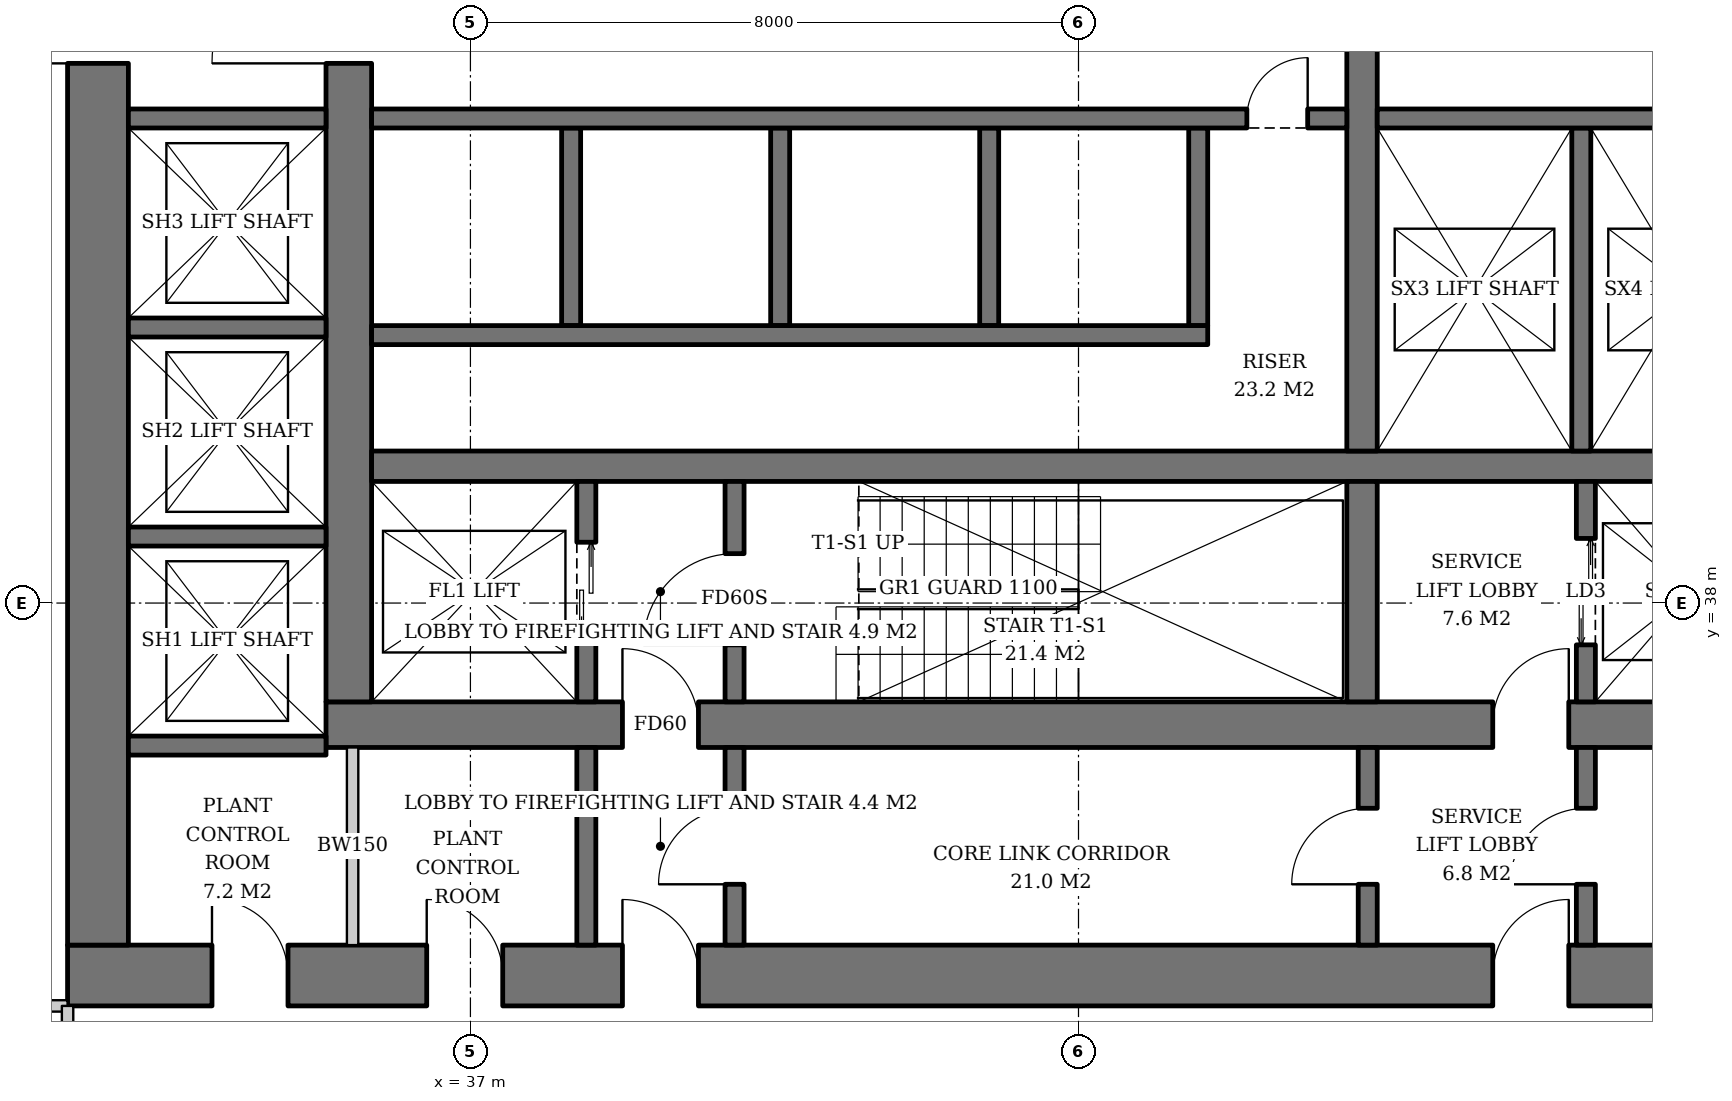
"""IFC4 building model, lengths in metres.
Left out: names, types, materials, properties, quantities, classifications, styles, units other than length and angle.
Written with IfcOpenShell. Run it as: python <this file> out.ifc"""

import sys

from ifc_helpers import new_model, si_unit, direction, frame, frame_2d, origin, place, context, subcontext, project, spatial, rectangle, extrude, element, fill, save


model = new_model("IFC4")
c1 = context("Model", 3, precision=1e-05, world=origin(), true_north=direction((0.0, 1.0)))
c2 = subcontext(c1, "Body", "Model", "MODEL_VIEW")
j1 = project(units=[si_unit("LENGTHUNIT", "METRE"), si_unit("PLANEANGLEUNIT", "RADIAN")], contexts=[c1])
p1 = place(None, origin())
s1 = spatial("IfcSite", under=j1, at=p1, CompositionType="ELEMENT")
p2 = place(p1, origin())
s2 = spatial("IfcBuilding", under=s1, at=p2, CompositionType="ELEMENT")
p3 = place(p2, frame((0.0, 0.0, 85.6)))
s3 = spatial("IfcBuildingStorey", under=s2, at=p3, CompositionType="ELEMENT", Elevation=85.6)
p4 = place(p3, frame((35.1, 36.4, 0.0), z_axis=(0.0, 0.0, 1.0), x_axis=(1.0, 0.0, 0.0)))
e1 = element("IfcWall", 1, at=p4, inside=s3, PredefinedType="SHEAR", context=c2, shape_type="SweptSolid", body=[
    extrude(rectangle(XDim=19.8, YDim=0.6, at=frame_2d((9.9, 0.0))), origin(), (0.0, 0.0, 1.0), 3.8),
])
p5 = place(p4, frame((3.9, 0.0, 0.0)))
e2 = element("IfcOpeningElement", 2, at=p5, cuts=e1, PredefinedType="OPENING", context=c2, shape_type="SweptSolid", body=[
    extrude(rectangle(XDim=1.0, YDim=2.1, at=frame_2d((0.5, 1.05))), frame((0.0, 0.31, 0.0), z_axis=(0.0, -1.0, 0.0), x_axis=(1.0, 0.0, 0.0)), (0.0, 0.0, 1.0), 0.62),
])
p6 = place(p4, frame((15.35, 0.0, 0.0)))
e3 = element("IfcOpeningElement", 3, at=p6, cuts=e1, PredefinedType="OPENING", context=c2, shape_type="SweptSolid", body=[
    extrude(rectangle(XDim=1.0, YDim=2.1, at=frame_2d((0.5, 1.05))), frame((0.0, 0.31, 0.0), z_axis=(0.0, -1.0, 0.0), x_axis=(1.0, 0.0, 0.0)), (0.0, 0.0, 1.0), 0.62),
])
p7 = place(p3, frame((35.4, 36.7, 0.0), z_axis=(0.0, 0.0, 1.0), x_axis=(0.0, 1.0, 0.0)))
e4 = element("IfcWall", 4, at=p7, inside=s3, PredefinedType="SHEAR", context=c2, shape_type="SweptSolid", body=[
    extrude(rectangle(XDim=18.6, YDim=0.6, at=frame_2d((9.3, 0.0))), origin(), (0.0, 0.0, 1.0), 3.8),
])
p8 = place(p7, frame((8.4, 0.0, 0.0)))
e5 = element("IfcOpeningElement", 5, at=p8, cuts=e4, PredefinedType="OPENING", context=c2, shape_type="SweptSolid", body=[
    extrude(rectangle(XDim=1.8, YDim=2.4, at=frame_2d((0.9, 1.2))), frame((0.0, 0.31, 0.0), z_axis=(0.0, -1.0, 0.0), x_axis=(1.0, 0.0, 0.0)), (0.0, 0.0, 1.0), 0.62),
])
p9 = place(p3, frame((31.7, 33.1, 0.0), z_axis=(0.0, 0.0, 1.0), x_axis=(1.0, 0.0, 0.0)))
e6 = element("IfcWall", 6, at=p9, inside=s3, PredefinedType="SHEAR", context=c2, shape_type="SweptSolid", body=[
    extrude(rectangle(XDim=26.6, YDim=0.8, at=frame_2d((13.3, 0.0))), origin(), (0.0, 0.0, 1.0), 3.8),
])
p10 = place(p9, frame((7.3, 0.0, 0.0)))
e7 = element("IfcOpeningElement", 7, at=p10, cuts=e6, PredefinedType="OPENING", context=c2, shape_type="SweptSolid", body=[
    extrude(rectangle(XDim=1.0, YDim=2.1, at=frame_2d((0.5, 1.05))), frame((0.0, 0.41, 0.0), z_axis=(0.0, -1.0, 0.0), x_axis=(1.0, 0.0, 0.0)), (0.0, 0.0, 1.0), 0.82),
])
p11 = place(p9, frame((18.75, 0.0, 0.0)))
e8 = element("IfcOpeningElement", 8, at=p11, cuts=e6, PredefinedType="OPENING", context=c2, shape_type="SweptSolid", body=[
    extrude(rectangle(XDim=1.0, YDim=2.1, at=frame_2d((0.5, 1.05))), frame((0.0, 0.41, 0.0), z_axis=(0.0, -1.0, 0.0), x_axis=(1.0, 0.0, 0.0)), (0.0, 0.0, 1.0), 0.82),
])
p12 = place(p9, frame((1.9, 0.0, 0.0)))
e9 = element("IfcOpeningElement", 9, at=p12, cuts=e6, PredefinedType="OPENING", context=c2, shape_type="SweptSolid", body=[
    extrude(rectangle(XDim=1.0, YDim=2.1, at=frame_2d((0.5, 1.05))), frame((0.0, 0.41, 0.0), z_axis=(0.0, -1.0, 0.0), x_axis=(1.0, 0.0, 0.0)), (0.0, 0.0, 1.0), 0.82),
])
p13 = place(p9, frame((4.725, 0.0, 0.0)))
e10 = element("IfcOpeningElement", 10, at=p13, cuts=e6, PredefinedType="OPENING", context=c2, shape_type="SweptSolid", body=[
    extrude(rectangle(XDim=1.0, YDim=2.1, at=frame_2d((0.5, 1.05))), frame((0.0, 0.41, 0.0), z_axis=(0.0, -1.0, 0.0), x_axis=(1.0, 0.0, 0.0)), (0.0, 0.0, 1.0), 0.82),
])
p14 = place(p3, frame((32.1, 33.5, 0.0), z_axis=(0.0, 0.0, 1.0), x_axis=(0.0, 1.0, 0.0)))
e11 = element("IfcWall", 11, at=p14, inside=s3, PredefinedType="SHEAR", context=c2, shape_type="SweptSolid", body=[
    extrude(rectangle(XDim=25.0, YDim=0.8, at=frame_2d((12.5, 0.0))), origin(), (0.0, 0.0, 1.0), 3.8),
])
p15 = place(p14, frame((11.6, 0.0, 0.0)))
e12 = element("IfcOpeningElement", 12, at=p15, cuts=e11, PredefinedType="OPENING", context=c2, shape_type="SweptSolid", body=[
    extrude(rectangle(XDim=1.8, YDim=2.4, at=frame_2d((0.9, 1.2))), frame((0.0, 0.41, 0.0), z_axis=(0.0, -1.0, 0.0), x_axis=(1.0, 0.0, 0.0)), (0.0, 0.0, 1.0), 0.82),
])
p16 = place(p3, frame((35.7, 39.8, 0.0), z_axis=(0.0, 0.0, 1.0), x_axis=(1.0, 0.0, 0.0)))
e13 = element("IfcWall", 13, at=p16, inside=s3, PredefinedType="SHEAR", context=c2, shape_type="SweptSolid", body=[
    extrude(rectangle(XDim=18.6, YDim=0.4, at=frame_2d((9.3, 0.0))), origin(), (0.0, 0.0, 1.0), 3.8),
])
p17 = place(p3, frame((48.73, 36.7, 0.0), z_axis=(0.0, 0.0, 1.0), x_axis=(0.0, 1.0, 0.0)))
e14 = element("IfcWall", 14, at=p17, inside=s3, PredefinedType="SHEAR", context=c2, shape_type="SweptSolid", body=[
    extrude(rectangle(XDim=2.9, YDim=0.4, at=frame_2d((1.45, 0.0))), origin(), (0.0, 0.0, 1.0), 3.8),
])
p18 = place(p3, frame((48.73, 40.0, 0.0), z_axis=(0.0, 0.0, 1.0), x_axis=(0.0, 1.0, 0.0)))
e15 = element("IfcWall", 15, at=p18, inside=s3, PredefinedType="SHEAR", context=c2, shape_type="SweptSolid", body=[
    extrude(rectangle(XDim=12.0, YDim=0.4, at=frame_2d((6.0, 0.0))), origin(), (0.0, 0.0, 1.0), 3.8),
])
p19 = place(p18, frame((5.5, 0.0, 0.0)))
e16 = element("IfcOpeningElement", 16, at=p19, cuts=e15, PredefinedType="OPENING", context=c2, shape_type="SweptSolid", body=[
    extrude(rectangle(XDim=1.0, YDim=2.1, at=frame_2d((0.5, 1.05))), frame((0.0, 0.21, 0.0), z_axis=(0.0, -1.0, 0.0), x_axis=(1.0, 0.0, 0.0)), (0.0, 0.0, 1.0), 0.42),
])
p20 = place(p3, frame((38.525, 36.7, 0.0), z_axis=(0.0, 0.0, 1.0), x_axis=(0.0, 1.0, 0.0)))
e17 = element("IfcWall", 17, at=p20, inside=s3, PredefinedType="SHEAR", context=c2, shape_type="SweptSolid", body=[
    extrude(rectangle(XDim=2.9, YDim=0.25, at=frame_2d((1.45, 0.0))), origin(), (0.0, 0.0, 1.0), 3.8),
])
p21 = place(p20, frame((0.8, 0.0, 0.0)))
e18 = element("IfcOpeningElement", 18, at=p21, cuts=e17, PredefinedType="OPENING", context=c2, shape_type="SweptSolid", body=[
    extrude(rectangle(XDim=1.3, YDim=2.2, at=frame_2d((0.65, 1.1))), frame((0.0, 0.135, 0.0), z_axis=(0.0, -1.0, 0.0), x_axis=(1.0, 0.0, 0.0)), (0.0, 0.0, 1.0), 0.27),
])
p22 = place(p3, frame((40.475, 36.7, 0.0), z_axis=(0.0, 0.0, 1.0), x_axis=(0.0, 1.0, 0.0)))
e19 = element("IfcWall", 19, at=p22, inside=s3, PredefinedType="SHEAR", context=c2, shape_type="SweptSolid", body=[
    extrude(rectangle(XDim=2.9, YDim=0.25, at=frame_2d((1.45, 0.0))), origin(), (0.0, 0.0, 1.0), 3.8),
])
p23 = place(p22, frame((0.75, 0.0, 0.0)))
e20 = element("IfcOpeningElement", 20, at=p23, cuts=e19, PredefinedType="OPENING", context=c2, shape_type="SweptSolid", body=[
    extrude(rectangle(XDim=1.2, YDim=2.1, at=frame_2d((0.6, 1.05))), frame((0.0, 0.135, 0.0), z_axis=(0.0, -1.0, 0.0), x_axis=(1.0, 0.0, 0.0)), (0.0, 0.0, 1.0), 0.27),
])
p24 = place(p3, frame((51.675, 36.7, 0.0), z_axis=(0.0, 0.0, 1.0), x_axis=(0.0, 1.0, 0.0)))
e21 = element("IfcWall", 21, at=p24, inside=s3, PredefinedType="SHEAR", context=c2, shape_type="SweptSolid", body=[
    extrude(rectangle(XDim=2.9, YDim=0.25, at=frame_2d((1.45, 0.0))), origin(), (0.0, 0.0, 1.0), 3.8),
])
p25 = place(p24, frame((0.75, 0.0, 0.0)))
e22 = element("IfcOpeningElement", 22, at=p25, cuts=e21, PredefinedType="OPENING", context=c2, shape_type="SweptSolid", body=[
    extrude(rectangle(XDim=1.4, YDim=2.4, at=frame_2d((0.7, 1.2))), frame((0.0, 0.135, 0.0), z_axis=(0.0, -1.0, 0.0), x_axis=(1.0, 0.0, 0.0)), (0.0, 0.0, 1.0), 0.27),
])
for number, where, z_axis, x_axis in (
    (23, (38.325, 44.25, 0.0), (0.0, 0.0, 1.0), (0.0, -1.0, 0.0)),
    (24, (41.075, 44.25, 0.0), (0.0, 0.0, 1.0), (0.0, -1.0, 0.0)),
    (25, (43.825, 44.25, 0.0), (0.0, 0.0, 1.0), (0.0, -1.0, 0.0)),
    (26, (46.575, 44.25, 0.0), (0.0, 0.0, 1.0), (0.0, -1.0, 0.0)),
):
    element("IfcWall", number, at=place(p3, frame(where, z_axis=z_axis, x_axis=x_axis)), inside=s3, PredefinedType="SHEAR", context=c2, shape_type="SweptSolid", body=[
        extrude(rectangle(XDim=2.6, YDim=0.25, at=frame_2d((1.3, 0.0))), origin(), (0.0, 0.0, 1.0), 3.8),
    ])
p26 = place(p3, frame((35.7, 41.525, 0.0), z_axis=(0.0, 0.0, 1.0), x_axis=(1.0, 0.0, 0.0)))
e27 = element("IfcWall", 27, at=p26, inside=s3, PredefinedType="SHEAR", context=c2, shape_type="SweptSolid", body=[
    extrude(rectangle(XDim=11.0, YDim=0.25, at=frame_2d((5.5, 0.0))), origin(), (0.0, 0.0, 1.0), 3.8),
])
p27 = place(p3, frame((35.7, 44.375, 0.0), z_axis=(0.0, 0.0, 1.0), x_axis=(1.0, 0.0, 0.0)))
e28 = element("IfcWall", 28, at=p27, inside=s3, PredefinedType="SHEAR", context=c2, shape_type="SweptSolid", body=[
    extrude(rectangle(XDim=12.83, YDim=0.25, at=frame_2d((6.415, 0.0))), origin(), (0.0, 0.0, 1.0), 3.8),
])
p28 = place(p27, frame((11.515, 0.0, 0.0)))
e29 = element("IfcOpeningElement", 29, at=p28, cuts=e28, PredefinedType="OPENING", context=c2, shape_type="SweptSolid", body=[
    extrude(rectangle(XDim=0.8, YDim=2.0, at=frame_2d((0.4, 1.0))), frame((0.0, 0.135, 0.0), z_axis=(0.0, -1.0, 0.0), x_axis=(1.0, 0.0, 0.0)), (0.0, 0.0, 1.0), 0.27),
])
p29 = place(p3, frame((51.615, 44.25, 0.0), z_axis=(0.0, 0.0, 1.0), x_axis=(0.0, -1.0, 0.0)))
e30 = element("IfcWall", 30, at=p29, inside=s3, PredefinedType="SHEAR", context=c2, shape_type="SweptSolid", body=[
    extrude(rectangle(XDim=4.25, YDim=0.25, at=frame_2d((2.125, 0.0))), origin(), (0.0, 0.0, 1.0), 3.8),
])
p30 = place(p3, frame((48.93, 44.375, 0.0), z_axis=(0.0, 0.0, 1.0), x_axis=(1.0, 0.0, 0.0)))
e31 = element("IfcWall", 31, at=p30, inside=s3, PredefinedType="SHEAR", context=c2, shape_type="SweptSolid", body=[
    extrude(rectangle(XDim=5.37, YDim=0.25, at=frame_2d((2.685, 0.0))), origin(), (0.0, 0.0, 1.0), 3.8),
])
for number, where, z_axis, x_axis in (
    (32, (32.5, 36.125, 0.0), (0.0, 0.0, 1.0), (1.0, 0.0, 0.0)),
    (33, (32.5, 38.875, 0.0), (0.0, 0.0, 1.0), (1.0, 0.0, 0.0)),
    (34, (32.5, 41.625, 0.0), (0.0, 0.0, 1.0), (1.0, 0.0, 0.0)),
    (35, (32.5, 44.375, 0.0), (0.0, 0.0, 1.0), (1.0, 0.0, 0.0)),
):
    element("IfcWall", number, at=place(p3, frame(where, z_axis=z_axis, x_axis=x_axis)), inside=s3, PredefinedType="SHEAR", context=c2, shape_type="SweptSolid", body=[
        extrude(rectangle(XDim=2.6, YDim=0.25, at=frame_2d((1.3, 0.0))), origin(), (0.0, 0.0, 1.0), 3.8),
    ])
p31 = place(p3, frame((38.525, 33.5, 0.0), z_axis=(0.0, 0.0, 1.0), x_axis=(0.0, 1.0, 0.0)))
e36 = element("IfcWall", 36, at=p31, inside=s3, PredefinedType="SOLIDWALL", context=c2, shape_type="SweptSolid", body=[
    extrude(rectangle(XDim=2.6, YDim=0.25, at=frame_2d((1.3, 0.0))), origin(), (0.0, 0.0, 1.0), 3.6),
])
p32 = place(p3, frame((40.475, 33.5, 0.0), z_axis=(0.0, 0.0, 1.0), x_axis=(0.0, 1.0, 0.0)))
e37 = element("IfcWall", 37, at=p32, inside=s3, PredefinedType="SOLIDWALL", context=c2, shape_type="SweptSolid", body=[
    extrude(rectangle(XDim=2.6, YDim=0.25, at=frame_2d((1.3, 0.0))), origin(), (0.0, 0.0, 1.0), 3.6),
])
p33 = place(p32, frame((0.8, 0.0, 0.0)))
e38 = element("IfcOpeningElement", 38, at=p33, cuts=e37, PredefinedType="OPENING", context=c2, shape_type="SweptSolid", body=[
    extrude(rectangle(XDim=1.0, YDim=2.1, at=frame_2d((0.5, 1.05))), frame((0.0, 0.135, 0.0), z_axis=(0.0, -1.0, 0.0), x_axis=(1.0, 0.0, 0.0)), (0.0, 0.0, 1.0), 0.27),
])
p34 = place(p3, frame((48.805, 33.5, 0.0), z_axis=(0.0, 0.0, 1.0), x_axis=(0.0, 1.0, 0.0)))
e39 = element("IfcWall", 39, at=p34, inside=s3, PredefinedType="SOLIDWALL", context=c2, shape_type="SweptSolid", body=[
    extrude(rectangle(XDim=2.6, YDim=0.25, at=frame_2d((1.3, 0.0))), origin(), (0.0, 0.0, 1.0), 3.6),
])
p35 = place(p34, frame((0.8, 0.0, 0.0)))
e40 = element("IfcOpeningElement", 40, at=p35, cuts=e39, PredefinedType="OPENING", context=c2, shape_type="SweptSolid", body=[
    extrude(rectangle(XDim=1.0, YDim=2.1, at=frame_2d((0.5, 1.05))), frame((0.0, 0.135, 0.0), z_axis=(0.0, -1.0, 0.0), x_axis=(1.0, 0.0, 0.0)), (0.0, 0.0, 1.0), 0.27),
])
p36 = place(p3, frame((51.675, 33.5, 0.0), z_axis=(0.0, 0.0, 1.0), x_axis=(0.0, 1.0, 0.0)))
e41 = element("IfcWall", 41, at=p36, inside=s3, PredefinedType="SOLIDWALL", context=c2, shape_type="SweptSolid", body=[
    extrude(rectangle(XDim=2.6, YDim=0.25, at=frame_2d((1.3, 0.0))), origin(), (0.0, 0.0, 1.0), 3.6),
])
p37 = place(p36, frame((0.8, 0.0, 0.0)))
e42 = element("IfcOpeningElement", 42, at=p37, cuts=e41, PredefinedType="OPENING", context=c2, shape_type="SweptSolid", body=[
    extrude(rectangle(XDim=1.0, YDim=2.1, at=frame_2d((0.5, 1.05))), frame((0.0, 0.135, 0.0), z_axis=(0.0, -1.0, 0.0), x_axis=(1.0, 0.0, 0.0)), (0.0, 0.0, 1.0), 0.27),
])
p38 = place(p3, frame((35.45, 33.5, 0.0), z_axis=(0.0, 0.0, 1.0), x_axis=(0.0, 1.0, 0.0)))
e43 = element("IfcWall", 43, at=p38, inside=s3, PredefinedType="SOLIDWALL", context=c2, shape_type="SweptSolid", body=[
    extrude(rectangle(XDim=2.6, YDim=0.15, at=frame_2d((1.3, 0.0))), origin(), (0.0, 0.0, 1.0), 3.6),
])
p39 = place(p3, frame((31.7, 32.7, 0.0), z_axis=(0.0, 0.0, 1.0), x_axis=(-1.0, 0.0, 0.0)))
e44 = element("IfcWall", 44, at=p39, inside=s3, PredefinedType="PARTITIONING", context=c2, shape_type="SweptSolid", body=[
    extrude(rectangle(XDim=2.0, YDim=0.15, at=frame_2d((1.0, 0.0))), origin(), (0.0, 0.0, 1.0), 3.6),
])
p40 = place(p3, frame((31.7, 32.7, 0.0), z_axis=(0.0, 0.0, 1.0), x_axis=(0.0, -1.0, 0.0)))
e45 = element("IfcWall", 45, at=p40, inside=s3, PredefinedType="PARTITIONING", context=c2, shape_type="SweptSolid", body=[
    extrude(rectangle(XDim=2.0, YDim=0.15, at=frame_2d((1.0, 0.0))), origin(), (0.0, 0.0, 1.0), 2.592),
])
p41 = place(p21, origin())
e46 = element("IfcDoor", 46, at=p41, inside=s3, OperationType="DOUBLE_DOOR_SLIDING", PredefinedType="DOOR", context=c2, shape_type="SweptSolid", body=[
    extrude(rectangle(XDim=1.3, YDim=2.2, at=frame_2d((0.65, 1.1))), frame((0.0, 0.025, 0.0), z_axis=(0.0, -1.0, 0.0), x_axis=(1.0, 0.0, 0.0)), (0.0, 0.0, 1.0), 0.05),
])
fill(e18, e46)
p42 = place(p23, origin())
e47 = element("IfcDoor", 47, at=p42, inside=s3, OperationType="SINGLE_SWING_LEFT", PredefinedType="DOOR", context=c2, shape_type="SweptSolid", body=[
    extrude(rectangle(XDim=1.2, YDim=2.1, at=frame_2d((0.6, 1.05))), frame((0.0, 0.025, 0.0), z_axis=(0.0, -1.0, 0.0), x_axis=(1.0, 0.0, 0.0)), (0.0, 0.0, 1.0), 0.05),
])
fill(e20, e47)
p43 = place(p25, origin())
e48 = element("IfcDoor", 48, at=p43, inside=s3, OperationType="DOUBLE_DOOR_SLIDING", PredefinedType="DOOR", context=c2, shape_type="SweptSolid", body=[
    extrude(rectangle(XDim=1.4, YDim=2.4, at=frame_2d((0.7, 1.2))), frame((0.0, 0.025, 0.0), z_axis=(0.0, -1.0, 0.0), x_axis=(1.0, 0.0, 0.0)), (0.0, 0.0, 1.0), 0.05),
])
fill(e22, e48)
p44 = place(p28, origin())
e49 = element("IfcDoor", 49, at=p44, inside=s3, OperationType="SINGLE_SWING_RIGHT", PredefinedType="DOOR", context=c2, shape_type="SweptSolid", body=[
    extrude(rectangle(XDim=0.8, YDim=2.0, at=frame_2d((0.4, 1.0))), frame((0.0, 0.025, 0.0), z_axis=(0.0, -1.0, 0.0), x_axis=(1.0, 0.0, 0.0)), (0.0, 0.0, 1.0), 0.05),
])
fill(e29, e49)
p45 = place(p33, origin())
e50 = element("IfcDoor", 50, at=p45, inside=s3, OperationType="SINGLE_SWING_LEFT", PredefinedType="DOOR", context=c2, shape_type="SweptSolid", body=[
    extrude(rectangle(XDim=1.0, YDim=2.1, at=frame_2d((0.5, 1.05))), frame((0.0, 0.025, 0.0), z_axis=(0.0, -1.0, 0.0), x_axis=(1.0, 0.0, 0.0)), (0.0, 0.0, 1.0), 0.05),
])
fill(e38, e50)
p46 = place(p35, origin())
e51 = element("IfcDoor", 51, at=p46, inside=s3, OperationType="SINGLE_SWING_LEFT", PredefinedType="DOOR", context=c2, shape_type="SweptSolid", body=[
    extrude(rectangle(XDim=1.0, YDim=2.1, at=frame_2d((0.5, 1.05))), frame((0.0, 0.025, 0.0), z_axis=(0.0, -1.0, 0.0), x_axis=(1.0, 0.0, 0.0)), (0.0, 0.0, 1.0), 0.05),
])
fill(e40, e51)
p47 = place(p37, origin())
e52 = element("IfcDoor", 52, at=p47, inside=s3, OperationType="SINGLE_SWING_LEFT", PredefinedType="DOOR", context=c2, shape_type="SweptSolid", body=[
    extrude(rectangle(XDim=1.0, YDim=2.1, at=frame_2d((0.5, 1.05))), frame((0.0, 0.025, 0.0), z_axis=(0.0, -1.0, 0.0), x_axis=(1.0, 0.0, 0.0)), (0.0, 0.0, 1.0), 0.05),
])
fill(e42, e52)
p48 = place(p5, origin())
e53 = element("IfcDoor", 53, at=p48, inside=s3, OperationType="SINGLE_SWING_LEFT", PredefinedType="DOOR", context=c2, shape_type="SweptSolid", body=[
    extrude(rectangle(XDim=1.0, YDim=2.1, at=frame_2d((0.5, 1.05))), frame((0.0, 0.025, 0.0), z_axis=(0.0, -1.0, 0.0), x_axis=(1.0, 0.0, 0.0)), (0.0, 0.0, 1.0), 0.05),
])
fill(e2, e53)
p49 = place(p8, origin())
e54 = element("IfcDoor", 54, at=p49, inside=s3, OperationType="DOUBLE_DOOR_SINGLE_SWING", PredefinedType="DOOR", context=c2, shape_type="SweptSolid", body=[
    extrude(rectangle(XDim=1.8, YDim=2.4, at=frame_2d((0.9, 1.2))), frame((0.0, 0.025, 0.0), z_axis=(0.0, -1.0, 0.0), x_axis=(1.0, 0.0, 0.0)), (0.0, 0.0, 1.0), 0.05),
])
fill(e5, e54)
p50 = place(p6, origin())
e55 = element("IfcDoor", 55, at=p50, inside=s3, OperationType="SINGLE_SWING_RIGHT", PredefinedType="DOOR", context=c2, shape_type="SweptSolid", body=[
    extrude(rectangle(XDim=1.0, YDim=2.1, at=frame_2d((0.5, 1.05))), frame((0.0, 0.025, 0.0), z_axis=(0.0, -1.0, 0.0), x_axis=(1.0, 0.0, 0.0)), (0.0, 0.0, 1.0), 0.05),
])
fill(e3, e55)
p51 = place(p15, origin())
e56 = element("IfcDoor", 56, at=p51, inside=s3, OperationType="DOUBLE_DOOR_SINGLE_SWING", PredefinedType="DOOR", context=c2, shape_type="SweptSolid", body=[
    extrude(rectangle(XDim=1.8, YDim=2.4, at=frame_2d((0.9, 1.2))), frame((0.0, 0.025, 0.0), z_axis=(0.0, -1.0, 0.0), x_axis=(1.0, 0.0, 0.0)), (0.0, 0.0, 1.0), 0.05),
])
fill(e12, e56)
p52 = place(p10, origin())
e57 = element("IfcDoor", 57, at=p52, inside=s3, OperationType="SINGLE_SWING_LEFT", PredefinedType="DOOR", context=c2, shape_type="SweptSolid", body=[
    extrude(rectangle(XDim=1.0, YDim=2.1, at=frame_2d((0.5, 1.05))), frame((0.0, 0.025, 0.0), z_axis=(0.0, -1.0, 0.0), x_axis=(1.0, 0.0, 0.0)), (0.0, 0.0, 1.0), 0.05),
])
fill(e7, e57)
p53 = place(p11, origin())
e58 = element("IfcDoor", 58, at=p53, inside=s3, OperationType="SINGLE_SWING_RIGHT", PredefinedType="DOOR", context=c2, shape_type="SweptSolid", body=[
    extrude(rectangle(XDim=1.0, YDim=2.1, at=frame_2d((0.5, 1.05))), frame((0.0, 0.025, 0.0), z_axis=(0.0, -1.0, 0.0), x_axis=(1.0, 0.0, 0.0)), (0.0, 0.0, 1.0), 0.05),
])
fill(e8, e58)
p54 = place(p12, origin())
e59 = element("IfcDoor", 59, at=p54, inside=s3, OperationType="SINGLE_SWING_LEFT", PredefinedType="DOOR", context=c2, shape_type="SweptSolid", body=[
    extrude(rectangle(XDim=1.0, YDim=2.1, at=frame_2d((0.5, 1.05))), frame((0.0, 0.39, 0.0), z_axis=(0.0, -1.0, 0.0), x_axis=(1.0, 0.0, 0.0)), (0.0, 0.0, 1.0), 0.05),
])
fill(e9, e59)
p55 = place(p13, origin())
e60 = element("IfcDoor", 60, at=p55, inside=s3, OperationType="SINGLE_SWING_LEFT", PredefinedType="DOOR", context=c2, shape_type="SweptSolid", body=[
    extrude(rectangle(XDim=1.0, YDim=2.1, at=frame_2d((0.5, 1.05))), frame((0.0, 0.39, 0.0), z_axis=(0.0, -1.0, 0.0), x_axis=(1.0, 0.0, 0.0)), (0.0, 0.0, 1.0), 0.05),
])
fill(e10, e60)
save(model, sys.argv[1])
